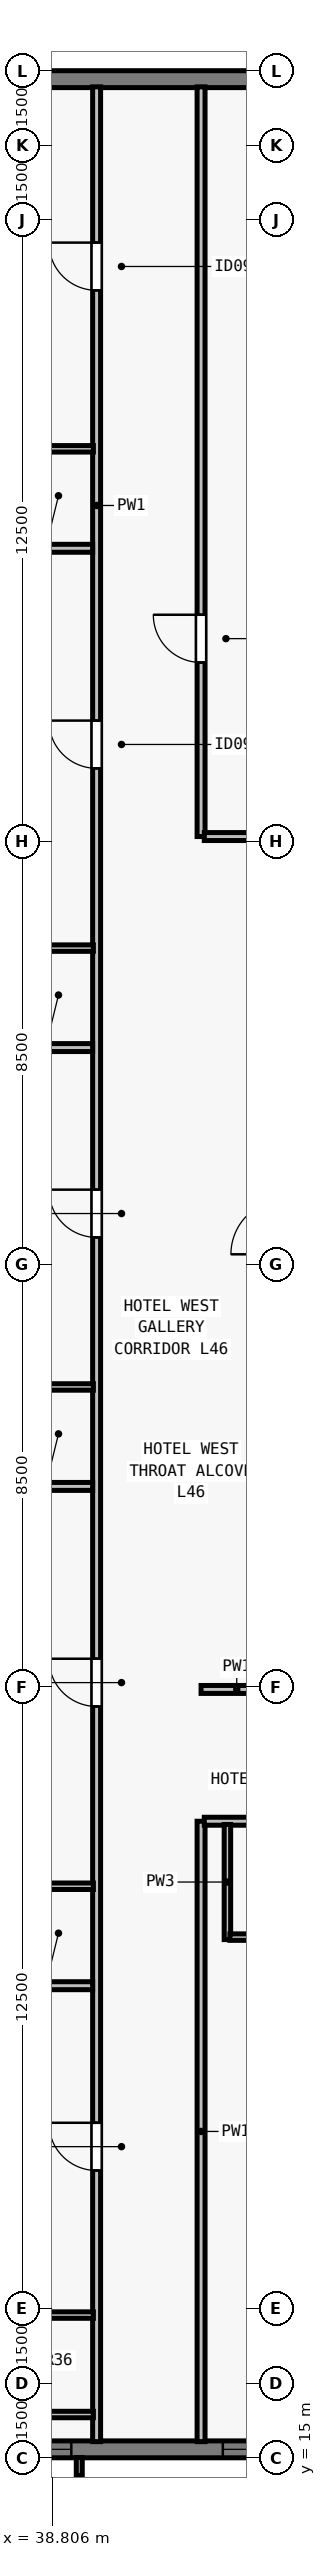
"""IFC4 building model, lengths in metres.
Left out: names, types, materials, properties, quantities, classifications, styles, units other than length and angle.
Written with IfcOpenShell. Run it as: python <this file> out.ifc"""

import sys

from ifc_helpers import new_model, si_unit, direction, frame, frame_2d, origin, place, context, subcontext, project, spatial, rectangle, extrude, element, fill, save


model = new_model("IFC4")
c1 = context("Model", 3, precision=1e-05, world=origin(), true_north=direction((0.0, 1.0)))
c2 = subcontext(c1, "Body", "Model", "MODEL_VIEW")
j1 = project(units=[si_unit("LENGTHUNIT", "METRE"), si_unit("PLANEANGLEUNIT", "RADIAN")], contexts=[c1])
p1 = place(None, origin())
s1 = spatial("IfcSite", under=j1, at=p1, CompositionType="ELEMENT")
p2 = place(p1, origin())
s2 = spatial("IfcBuilding", under=s1, at=p2, CompositionType="ELEMENT")
p3 = place(p2, frame((0.0, 0.0, 169.0)))
s3 = spatial("IfcBuildingStorey", under=s2, at=p3, CompositionType="ELEMENT", Elevation=169.0)
p4 = place(p3, frame((59.0, 15.17, 0.0), z_axis=(0.0, 0.0, 1.0), x_axis=(-1.0, 0.0, 0.0)))
e1 = element("IfcWall", 1, at=p4, inside=s3, PredefinedType="SOLIDWALL", context=c2, shape_type="SweptSolid", body=[
    extrude(rectangle(XDim=26.682, YDim=0.34, at=frame_2d((13.341, 0.0))), origin(), (0.0, 0.0, 1.0), 3.28),
])
p5 = place(p4, frame((5.073, 0.0, 0.8)))
e2 = element("IfcOpeningElement", 2, at=p5, cuts=e1, PredefinedType="OPENING", context=c2, shape_type="SweptSolid", body=[
    extrude(rectangle(XDim=1.35, YDim=1.66, at=frame_2d((0.675, 0.83))), frame((0.0, 0.18, 0.0), z_axis=(0.0, -1.0, 0.0), x_axis=(1.0, 0.0, 0.0)), (0.0, 0.0, 1.0), 0.36),
])
p6 = place(p4, frame((8.219, 0.0, 0.8)))
e3 = element("IfcOpeningElement", 3, at=p6, cuts=e1, PredefinedType="OPENING", context=c2, shape_type="SweptSolid", body=[
    extrude(rectangle(XDim=1.75, YDim=1.66, at=frame_2d((0.875, 0.83))), frame((0.0, 0.18, 0.0), z_axis=(0.0, -1.0, 0.0), x_axis=(1.0, 0.0, 0.0)), (0.0, 0.0, 1.0), 0.36),
])
p7 = place(p4, frame((12.666, 0.0, 0.8)))
e4 = element("IfcOpeningElement", 4, at=p7, cuts=e1, PredefinedType="OPENING", context=c2, shape_type="SweptSolid", body=[
    extrude(rectangle(XDim=1.35, YDim=1.66, at=frame_2d((0.675, 0.83))), frame((0.0, 0.18, 0.0), z_axis=(0.0, -1.0, 0.0), x_axis=(1.0, 0.0, 0.0)), (0.0, 0.0, 1.0), 0.36),
])
p8 = place(p4, frame((15.012, 0.0, 0.8)))
e5 = element("IfcOpeningElement", 5, at=p8, cuts=e1, PredefinedType="OPENING", context=c2, shape_type="SweptSolid", body=[
    extrude(rectangle(XDim=1.75, YDim=1.66, at=frame_2d((0.875, 0.83))), frame((0.0, 0.18, 0.0), z_axis=(0.0, -1.0, 0.0), x_axis=(1.0, 0.0, 0.0)), (0.0, 0.0, 1.0), 0.36),
])
p9 = place(p4, frame((19.809, 0.0, 0.8)))
e6 = element("IfcOpeningElement", 6, at=p9, cuts=e1, PredefinedType="OPENING", context=c2, shape_type="SweptSolid", body=[
    extrude(rectangle(XDim=1.35, YDim=1.66, at=frame_2d((0.675, 0.83))), frame((0.0, 0.18, 0.0), z_axis=(0.0, -1.0, 0.0), x_axis=(1.0, 0.0, 0.0)), (0.0, 0.0, 1.0), 0.36),
])
p10 = place(p3, frame((32.0, 62.83, 0.0), z_axis=(0.0, 0.0, 1.0), x_axis=(1.0, 0.0, 0.0)))
e7 = element("IfcWall", 7, at=p10, inside=s3, PredefinedType="SOLIDWALL", context=c2, shape_type="SweptSolid", body=[
    extrude(rectangle(XDim=39.682, YDim=0.34, at=frame_2d((19.841, 0.0))), origin(), (0.0, 0.0, 1.0), 3.28),
])
p11 = place(p10, frame((4.952, 0.0, 0.8)))
e8 = element("IfcOpeningElement", 8, at=p11, cuts=e7, PredefinedType="OPENING", context=c2, shape_type="SweptSolid", body=[
    extrude(rectangle(XDim=1.35, YDim=1.66, at=frame_2d((0.675, 0.83))), frame((0.0, 0.18, 0.0), z_axis=(0.0, -1.0, 0.0), x_axis=(1.0, 0.0, 0.0)), (0.0, 0.0, 1.0), 0.36),
])
p12 = place(p10, frame((12.059, 0.0, 0.8)))
e9 = element("IfcOpeningElement", 9, at=p12, cuts=e7, PredefinedType="OPENING", context=c2, shape_type="SweptSolid", body=[
    extrude(rectangle(XDim=1.35, YDim=1.66, at=frame_2d((0.675, 0.83))), frame((0.0, 0.18, 0.0), z_axis=(0.0, -1.0, 0.0), x_axis=(1.0, 0.0, 0.0)), (0.0, 0.0, 1.0), 0.36),
])
p13 = place(p10, frame((19.166, 0.0, 0.8)))
e10 = element("IfcOpeningElement", 10, at=p13, cuts=e7, PredefinedType="OPENING", context=c2, shape_type="SweptSolid", body=[
    extrude(rectangle(XDim=1.35, YDim=1.66, at=frame_2d((0.675, 0.83))), frame((0.0, 0.18, 0.0), z_axis=(0.0, -1.0, 0.0), x_axis=(1.0, 0.0, 0.0)), (0.0, 0.0, 1.0), 0.36),
])
p14 = place(p10, frame((21.27, 0.0, 0.8)))
e11 = element("IfcOpeningElement", 11, at=p14, cuts=e7, PredefinedType="OPENING", context=c2, shape_type="SweptSolid", body=[
    extrude(rectangle(XDim=1.75, YDim=1.66, at=frame_2d((0.875, 0.83))), frame((0.0, 0.18, 0.0), z_axis=(0.0, -1.0, 0.0), x_axis=(1.0, 0.0, 0.0)), (0.0, 0.0, 1.0), 0.36),
])
p15 = place(p10, frame((26.273, 0.0, 0.8)))
e12 = element("IfcOpeningElement", 12, at=p15, cuts=e7, PredefinedType="OPENING", context=c2, shape_type="SweptSolid", body=[
    extrude(rectangle(XDim=1.35, YDim=1.66, at=frame_2d((0.675, 0.83))), frame((0.0, 0.18, 0.0), z_axis=(0.0, -1.0, 0.0), x_axis=(1.0, 0.0, 0.0)), (0.0, 0.0, 1.0), 0.36),
])
p16 = place(p10, frame((29.627, 0.0, 0.8)))
e13 = element("IfcOpeningElement", 13, at=p16, cuts=e7, PredefinedType="OPENING", context=c2, shape_type="SweptSolid", body=[
    extrude(rectangle(XDim=1.75, YDim=1.66, at=frame_2d((0.875, 0.83))), frame((0.0, 0.18, 0.0), z_axis=(0.0, -1.0, 0.0), x_axis=(1.0, 0.0, 0.0)), (0.0, 0.0, 1.0), 0.36),
])
p17 = place(p10, frame((34.47, 0.0, 0.8)))
e14 = element("IfcOpeningElement", 14, at=p17, cuts=e7, PredefinedType="OPENING", context=c2, shape_type="SweptSolid", body=[
    extrude(rectangle(XDim=0.9, YDim=1.66, at=frame_2d((0.45, 0.83))), frame((0.0, 0.18, 0.0), z_axis=(0.0, -1.0, 0.0), x_axis=(1.0, 0.0, 0.0)), (0.0, 0.0, 1.0), 0.36),
])
p18 = place(p3, frame((39.7, 15.325, 0.0), z_axis=(0.0, 0.0, 1.0), x_axis=(0.0, 1.0, 0.0)))
e15 = element("IfcWall", 15, at=p18, inside=s3, PredefinedType="PARTITIONING", context=c2, shape_type="SweptSolid", body=[
    extrude(rectangle(XDim=47.35, YDim=0.16, at=frame_2d((23.675, 0.0))), origin(), (0.0, 0.0, 1.0), 2.555),
])
p19 = place(p18, frame((5.451, 0.0, 0.0)))
e16 = element("IfcOpeningElement", 16, at=p19, cuts=e15, PredefinedType="OPENING", context=c2, shape_type="SweptSolid", body=[
    extrude(rectangle(XDim=0.96, YDim=2.15, at=frame_2d((0.48, 1.075))), frame((0.0, 0.09, 0.0), z_axis=(0.0, -1.0, 0.0), x_axis=(1.0, 0.0, 0.0)), (0.0, 0.0, 1.0), 0.18),
])
p20 = place(p18, frame((14.783, 0.0, 0.0)))
e17 = element("IfcOpeningElement", 17, at=p20, cuts=e15, PredefinedType="OPENING", context=c2, shape_type="SweptSolid", body=[
    extrude(rectangle(XDim=0.96, YDim=2.15, at=frame_2d((0.48, 1.075))), frame((0.0, 0.09, 0.0), z_axis=(0.0, -1.0, 0.0), x_axis=(1.0, 0.0, 0.0)), (0.0, 0.0, 1.0), 0.18),
])
p21 = place(p18, frame((24.215, 0.0, 0.0)))
e18 = element("IfcOpeningElement", 18, at=p21, cuts=e15, PredefinedType="OPENING", context=c2, shape_type="SweptSolid", body=[
    extrude(rectangle(XDim=0.96, YDim=2.15, at=frame_2d((0.48, 1.075))), frame((0.0, 0.09, 0.0), z_axis=(0.0, -1.0, 0.0), x_axis=(1.0, 0.0, 0.0)), (0.0, 0.0, 1.0), 0.18),
])
p22 = place(p18, frame((33.647, 0.0, 0.0)))
e19 = element("IfcOpeningElement", 19, at=p22, cuts=e15, PredefinedType="OPENING", context=c2, shape_type="SweptSolid", body=[
    extrude(rectangle(XDim=0.96, YDim=2.15, at=frame_2d((0.48, 1.075))), frame((0.0, 0.09, 0.0), z_axis=(0.0, -1.0, 0.0), x_axis=(1.0, 0.0, 0.0)), (0.0, 0.0, 1.0), 0.18),
])
p23 = place(p18, frame((43.258, 0.0, 0.0)))
e20 = element("IfcOpeningElement", 20, at=p23, cuts=e15, PredefinedType="OPENING", context=c2, shape_type="SweptSolid", body=[
    extrude(rectangle(XDim=0.96, YDim=2.15, at=frame_2d((0.48, 1.075))), frame((0.0, 0.09, 0.0), z_axis=(0.0, -1.0, 0.0), x_axis=(1.0, 0.0, 0.0)), (0.0, 0.0, 1.0), 0.18),
])
p24 = place(p3, frame((41.8, 15.325, 0.0), z_axis=(0.0, 0.0, 1.0), x_axis=(0.0, 1.0, 0.0)))
e21 = element("IfcWall", 21, at=p24, inside=s3, PredefinedType="PARTITIONING", context=c2, shape_type="SweptSolid", body=[
    extrude(rectangle(XDim=12.475, YDim=0.16, at=frame_2d((6.238, 0.0))), origin(), (0.0, 0.0, 1.0), 3.28),
])
p25 = place(p3, frame((41.8, 47.6, 0.0), z_axis=(0.0, 0.0, 1.0), x_axis=(0.0, 1.0, 0.0)))
e22 = element("IfcWall", 22, at=p25, inside=s3, PredefinedType="PARTITIONING", context=c2, shape_type="SweptSolid", body=[
    extrude(rectangle(XDim=15.075, YDim=0.16, at=frame_2d((7.538, 0.0))), origin(), (0.0, 0.0, 1.0), 2.555),
])
p26 = place(p25, frame((3.5, 0.0, 0.0)))
e23 = element("IfcOpeningElement", 23, at=p26, cuts=e22, PredefinedType="OPENING", context=c2, shape_type="SweptSolid", body=[
    extrude(rectangle(XDim=0.96, YDim=2.12, at=frame_2d((0.48, 1.06))), frame((0.0, 0.09, 0.0), z_axis=(0.0, -1.0, 0.0), x_axis=(1.0, 0.0, 0.0)), (0.0, 0.0, 1.0), 0.18),
])
p27 = place(p3, frame((41.8, 30.45, 0.0), z_axis=(0.0, 0.0, 1.0), x_axis=(1.0, 0.0, 0.0)))
e24 = element("IfcWall", 24, at=p27, inside=s3, PredefinedType="PARTITIONING", context=c2, shape_type="SweptSolid", body=[
    extrude(rectangle(XDim=1.435, YDim=0.16, at=frame_2d((0.718, 0.0))), origin(), (0.0, 0.0, 1.0), 3.28),
])
p28 = place(p3, frame((41.865, 47.6, 0.0), z_axis=(0.0, 0.0, 1.0), x_axis=(1.0, 0.0, 0.0)))
e25 = element("IfcWall", 25, at=p28, inside=s3, PredefinedType="PARTITIONING", context=c2, shape_type="SweptSolid", body=[
    extrude(rectangle(XDim=1.37, YDim=0.16, at=frame_2d((0.685, 0.0))), origin(), (0.0, 0.0, 1.0), 3.28),
])
p29 = place(p3, frame((41.865, 27.8, 0.0), z_axis=(0.0, 0.0, 1.0), x_axis=(1.0, 0.0, 0.0)))
e26 = element("IfcWall", 26, at=p29, inside=s3, PredefinedType="PARTITIONING", context=c2, shape_type="SweptSolid", body=[
    extrude(rectangle(XDim=22.07, YDim=0.16, at=frame_2d((11.035, 0.0))), origin(), (0.0, 0.0, 1.0), 3.28),
])
p30 = place(p29, frame((4.232, 0.0, 0.0)))
e27 = element("IfcOpeningElement", 27, at=p30, cuts=e26, PredefinedType="OPENING", context=c2, shape_type="SweptSolid", body=[
    extrude(rectangle(XDim=0.96, YDim=2.15, at=frame_2d((0.48, 1.075))), frame((0.0, 0.09, 0.0), z_axis=(0.0, -1.0, 0.0), x_axis=(1.0, 0.0, 0.0)), (0.0, 0.0, 1.0), 0.18),
])
p31 = place(p29, frame((11.545, 0.0, 0.0)))
e28 = element("IfcOpeningElement", 28, at=p31, cuts=e26, PredefinedType="OPENING", context=c2, shape_type="SweptSolid", body=[
    extrude(rectangle(XDim=0.96, YDim=2.15, at=frame_2d((0.48, 1.075))), frame((0.0, 0.09, 0.0), z_axis=(0.0, -1.0, 0.0), x_axis=(1.0, 0.0, 0.0)), (0.0, 0.0, 1.0), 0.18),
])
p32 = place(p29, frame((19.168, 0.0, 0.0)))
e29 = element("IfcOpeningElement", 29, at=p32, cuts=e26, PredefinedType="OPENING", context=c2, shape_type="SweptSolid", body=[
    extrude(rectangle(XDim=0.96, YDim=2.15, at=frame_2d((0.48, 1.075))), frame((0.0, 0.09, 0.0), z_axis=(0.0, -1.0, 0.0), x_axis=(1.0, 0.0, 0.0)), (0.0, 0.0, 1.0), 0.18),
])
p33 = place(p3, frame((42.33, 25.42, 0.0), z_axis=(0.0, 0.0, 1.0), x_axis=(0.0, 1.0, 0.0)))
e30 = element("IfcWall", 30, at=p33, inside=s3, PredefinedType="PLUMBINGWALL", context=c2, shape_type="SweptSolid", body=[
    extrude(rectangle(XDim=2.315, YDim=0.13, at=frame_2d((1.158, 0.0))), origin(), (0.0, 0.0, 1.0), 3.28),
])
p34 = place(p3, frame((42.38, 25.47, 0.0), z_axis=(0.0, 0.0, 1.0), x_axis=(1.0, 0.0, 0.0)))
e31 = element("IfcWall", 31, at=p34, inside=s3, PredefinedType="PLUMBINGWALL", context=c2, shape_type="SweptSolid", body=[
    extrude(rectangle(XDim=1.9, YDim=0.13, at=frame_2d((0.95, 0.0))), origin(), (0.0, 0.0, 1.0), 3.28),
])
p35 = place(p34, frame((0.54, 0.0, 0.0)))
e32 = element("IfcOpeningElement", 32, at=p35, cuts=e31, PredefinedType="OPENING", context=c2, shape_type="SweptSolid", body=[
    extrude(rectangle(XDim=0.82, YDim=2.1, at=frame_2d((0.41, 1.05))), frame((0.0, 0.075, 0.0), z_axis=(0.0, -1.0, 0.0), x_axis=(1.0, 0.0, 0.0)), (0.0, 0.0, 1.0), 0.15),
])
for number, where, z_axis, x_axis in (
    (33, (37.32, 15.87, 0.0), (0.0, 0.0, 1.0), (1.0, 0.0, 0.0)),
    (34, (37.32, 17.87, 0.0), (0.0, 0.0, 1.0), (1.0, 0.0, 0.0)),
):
    element("IfcWall", number, at=place(p3, frame(where, z_axis=z_axis, x_axis=x_axis)), inside=s3, PredefinedType="PLUMBINGWALL", context=c2, shape_type="SweptSolid", body=[
        extrude(rectangle(XDim=2.315, YDim=0.13, at=frame_2d((1.157, 0.0))), origin(), (0.0, 0.0, 1.0), 3.28),
    ])
p36 = place(p3, frame((28.325, 24.493, 0.0), z_axis=(0.0, 0.0, 1.0), x_axis=(1.0, 0.0, 0.0)))
e35 = element("IfcWall", 35, at=p36, inside=s3, PredefinedType="PARTITIONING", context=c2, shape_type="SweptSolid", body=[
    extrude(rectangle(XDim=11.295, YDim=0.16, at=frame_2d((5.647, 0.0))), origin(), (0.0, 0.0, 1.0), 2.896),
])
p37 = place(p3, frame((37.32, 26.493, 0.0), z_axis=(0.0, 0.0, 1.0), x_axis=(1.0, 0.0, 0.0)))
e36 = element("IfcWall", 36, at=p37, inside=s3, PredefinedType="PLUMBINGWALL", context=c2, shape_type="SweptSolid", body=[
    extrude(rectangle(XDim=2.315, YDim=0.13, at=frame_2d((1.157, 0.0))), origin(), (0.0, 0.0, 1.0), 2.896),
])
p38 = place(p3, frame((28.325, 34.533, 0.0), z_axis=(0.0, 0.0, 1.0), x_axis=(1.0, 0.0, 0.0)))
e37 = element("IfcWall", 37, at=p38, inside=s3, PredefinedType="PARTITIONING", context=c2, shape_type="SweptSolid", body=[
    extrude(rectangle(XDim=11.295, YDim=0.16, at=frame_2d((5.647, 0.0))), origin(), (0.0, 0.0, 1.0), 2.896),
])
p39 = place(p3, frame((37.32, 36.533, 0.0), z_axis=(0.0, 0.0, 1.0), x_axis=(1.0, 0.0, 0.0)))
e38 = element("IfcWall", 38, at=p39, inside=s3, PredefinedType="PLUMBINGWALL", context=c2, shape_type="SweptSolid", body=[
    extrude(rectangle(XDim=2.315, YDim=0.13, at=frame_2d((1.157, 0.0))), origin(), (0.0, 0.0, 1.0), 3.28),
])
p40 = place(p3, frame((28.325, 43.357, 0.0), z_axis=(0.0, 0.0, 1.0), x_axis=(1.0, 0.0, 0.0)))
e39 = element("IfcWall", 39, at=p40, inside=s3, PredefinedType="PARTITIONING", context=c2, shape_type="SweptSolid", body=[
    extrude(rectangle(XDim=11.295, YDim=0.16, at=frame_2d((5.647, 0.0))), origin(), (0.0, 0.0, 1.0), 2.896),
])
p41 = place(p3, frame((37.32, 45.357, 0.0), z_axis=(0.0, 0.0, 1.0), x_axis=(1.0, 0.0, 0.0)))
e40 = element("IfcWall", 40, at=p41, inside=s3, PredefinedType="PLUMBINGWALL", context=c2, shape_type="SweptSolid", body=[
    extrude(rectangle(XDim=2.315, YDim=0.13, at=frame_2d((1.157, 0.0))), origin(), (0.0, 0.0, 1.0), 3.28),
])
p42 = place(p3, frame((28.325, 53.396, 0.0), z_axis=(0.0, 0.0, 1.0), x_axis=(1.0, 0.0, 0.0)))
e41 = element("IfcWall", 41, at=p42, inside=s3, PredefinedType="PARTITIONING", context=c2, shape_type="SweptSolid", body=[
    extrude(rectangle(XDim=11.295, YDim=0.16, at=frame_2d((5.647, 0.0))), origin(), (0.0, 0.0, 1.0), 2.896),
])
p43 = place(p3, frame((37.32, 55.396, 0.0), z_axis=(0.0, 0.0, 1.0), x_axis=(1.0, 0.0, 0.0)))
e42 = element("IfcWall", 42, at=p43, inside=s3, PredefinedType="PLUMBINGWALL", context=c2, shape_type="SweptSolid", body=[
    extrude(rectangle(XDim=2.315, YDim=0.13, at=frame_2d((1.157, 0.0))), origin(), (0.0, 0.0, 1.0), 3.28),
])
p44 = place(p8, origin())
e43 = element("IfcWindow", 43, at=p44, inside=s3, PartitioningType="SINGLE_PANEL", PredefinedType="WINDOW", context=c2, shape_type="SweptSolid", body=[
    extrude(rectangle(XDim=1.75, YDim=1.66, at=frame_2d((0.875, 0.83))), frame((0.0, -0.05, 0.0), z_axis=(0.0, -1.0, 0.0), x_axis=(1.0, 0.0, 0.0)), (0.0, 0.0, 1.0), 0.06),
])
fill(e5, e43)
p45 = place(p9, origin())
e44 = element("IfcWindow", 44, at=p45, inside=s3, PartitioningType="SINGLE_PANEL", PredefinedType="WINDOW", context=c2, shape_type="SweptSolid", body=[
    extrude(rectangle(XDim=1.35, YDim=1.66, at=frame_2d((0.675, 0.83))), frame((0.0, -0.05, 0.0), z_axis=(0.0, -1.0, 0.0), x_axis=(1.0, 0.0, 0.0)), (0.0, 0.0, 1.0), 0.06),
])
fill(e6, e44)
p46 = place(p26, origin())
e45 = element("IfcDoor", 45, at=p46, inside=s3, OperationType="SINGLE_SWING_RIGHT", PredefinedType="DOOR", context=c2, shape_type="SweptSolid", body=[
    extrude(rectangle(XDim=0.96, YDim=2.12, at=frame_2d((0.48, 1.06))), frame((0.0, 0.025, 0.0), z_axis=(0.0, -1.0, 0.0), x_axis=(1.0, 0.0, 0.0)), (0.0, 0.0, 1.0), 0.05),
])
fill(e23, e45)
p47 = place(p19, origin())
e46 = element("IfcDoor", 46, at=p47, inside=s3, OperationType="SINGLE_SWING_RIGHT", PredefinedType="DOOR", context=c2, shape_type="SweptSolid", body=[
    extrude(rectangle(XDim=0.96, YDim=2.15, at=frame_2d((0.48, 1.075))), frame((0.0, 0.025, 0.0), z_axis=(0.0, -1.0, 0.0), x_axis=(1.0, 0.0, 0.0)), (0.0, 0.0, 1.0), 0.05),
])
fill(e16, e46)
p48 = place(p20, origin())
e47 = element("IfcDoor", 47, at=p48, inside=s3, OperationType="SINGLE_SWING_RIGHT", PredefinedType="DOOR", context=c2, shape_type="SweptSolid", body=[
    extrude(rectangle(XDim=0.96, YDim=2.15, at=frame_2d((0.48, 1.075))), frame((0.0, 0.025, 0.0), z_axis=(0.0, -1.0, 0.0), x_axis=(1.0, 0.0, 0.0)), (0.0, 0.0, 1.0), 0.05),
])
fill(e17, e47)
p49 = place(p21, origin())
e48 = element("IfcDoor", 48, at=p49, inside=s3, OperationType="SINGLE_SWING_RIGHT", PredefinedType="DOOR", context=c2, shape_type="SweptSolid", body=[
    extrude(rectangle(XDim=0.96, YDim=2.15, at=frame_2d((0.48, 1.075))), frame((0.0, 0.025, 0.0), z_axis=(0.0, -1.0, 0.0), x_axis=(1.0, 0.0, 0.0)), (0.0, 0.0, 1.0), 0.05),
])
fill(e18, e48)
p50 = place(p22, origin())
e49 = element("IfcDoor", 49, at=p50, inside=s3, OperationType="SINGLE_SWING_RIGHT", PredefinedType="DOOR", context=c2, shape_type="SweptSolid", body=[
    extrude(rectangle(XDim=0.96, YDim=2.15, at=frame_2d((0.48, 1.075))), frame((0.0, 0.025, 0.0), z_axis=(0.0, -1.0, 0.0), x_axis=(1.0, 0.0, 0.0)), (0.0, 0.0, 1.0), 0.05),
])
fill(e19, e49)
p51 = place(p23, origin())
e50 = element("IfcDoor", 50, at=p51, inside=s3, OperationType="SINGLE_SWING_RIGHT", PredefinedType="DOOR", context=c2, shape_type="SweptSolid", body=[
    extrude(rectangle(XDim=0.96, YDim=2.15, at=frame_2d((0.48, 1.075))), frame((0.0, 0.025, 0.0), z_axis=(0.0, -1.0, 0.0), x_axis=(1.0, 0.0, 0.0)), (0.0, 0.0, 1.0), 0.05),
])
fill(e20, e50)
save(model, sys.argv[1])
